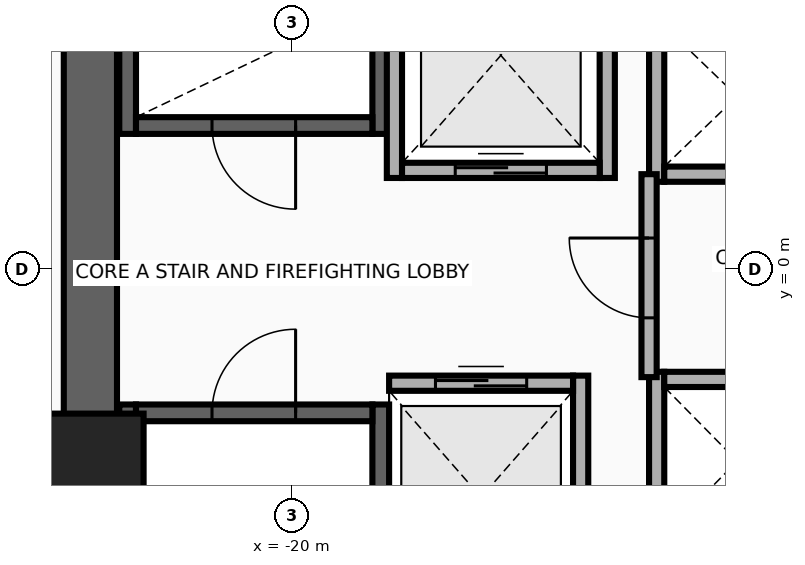
"""IFC4 building model, lengths in metres.
Left out: names, types, materials, properties, quantities, classifications, styles, units other than length and angle.
Written with IfcOpenShell. Run it as: python <this file> out.ifc"""

import sys

from ifc_helpers import new_model, si_unit, direction, frame, frame_2d, origin, origin_2d, place, context, subcontext, project, spatial, rectangle, extrude, source, transform, mapped, element, fill, save


model = new_model("IFC4")
c1 = context("Model", 3, precision=1e-05, world=origin(), true_north=direction((0.0, 1.0)))
c2 = subcontext(c1, "Body", "Model", "MODEL_VIEW")
j1 = project(units=[si_unit("LENGTHUNIT", "METRE"), si_unit("PLANEANGLEUNIT", "RADIAN")], contexts=[c1])
p1 = place(None, origin())
s1 = spatial("IfcSite", under=j1, at=p1, CompositionType="ELEMENT")
p2 = place(p1, origin())
s2 = spatial("IfcBuilding", under=s1, at=p2, CompositionType="ELEMENT")
p3 = place(p2, frame((0.0, 0.0, 66.7)))
s3 = spatial("IfcBuildingStorey", under=s2, at=p3, CompositionType="ELEMENT", Elevation=66.7)
for number, where, z_axis, x_axis in (
    (1, (-22.16, 1.78, 0.0), (0.0, 0.0, 1.0), (0.0, 1.0, 0.0)),
    (2, (-18.83, 1.78, 0.0), (0.0, 0.0, 1.0), (0.0, 1.0, 0.0)),
):
    element("IfcWall", number, at=place(p3, frame(where, z_axis=z_axis, x_axis=x_axis)), inside=s3, PredefinedType="SHEAR", context=c2, shape_type="SweptSolid", body=[
        extrude(rectangle(XDim=8.67, YDim=0.22, at=frame_2d((4.335, 0.0))), origin(), (0.0, 0.0, 1.0), 3.46),
    ])
p4 = place(p3, frame((-22.05, 1.89, 0.0), z_axis=(0.0, 0.0, 1.0), x_axis=(1.0, 0.0, 0.0)))
e3 = element("IfcWall", 3, at=p4, inside=s3, PredefinedType="SHEAR", context=c2, shape_type="SweptSolid", body=[
    extrude(rectangle(XDim=3.11, YDim=0.22, at=frame_2d((1.555, 0.0))), origin(), (0.0, 0.0, 1.0), 3.46),
])
p5 = place(p4, frame((1.0, 0.0, 0.0)))
e4 = element("IfcOpeningElement", 4, at=p5, cuts=e3, PredefinedType="OPENING", context=c2, shape_type="SweptSolid", body=[
    extrude(rectangle(XDim=1.1, YDim=2.15, at=frame_2d((0.55, 1.075))), frame((0.0, 0.125, 0.0), z_axis=(0.0, -1.0, 0.0), x_axis=(1.0, 0.0, 0.0)), (0.0, 0.0, 1.0), 0.25),
])
for number, where, z_axis, x_axis in (
    (5, (-22.16, -10.45, 0.0), (0.0, 0.0, 1.0), (0.0, 1.0, 0.0)),
    (6, (-18.83, -10.45, 0.0), (0.0, 0.0, 1.0), (0.0, 1.0, 0.0)),
):
    element("IfcWall", number, at=place(p3, frame(where, z_axis=z_axis, x_axis=x_axis)), inside=s3, PredefinedType="SHEAR", context=c2, shape_type="SweptSolid", body=[
        extrude(rectangle(XDim=8.67, YDim=0.22, at=frame_2d((4.335, 0.0))), origin(), (0.0, 0.0, 1.0), 3.46),
    ])
p6 = place(p3, frame((-22.05, -1.89, 0.0), z_axis=(0.0, 0.0, 1.0), x_axis=(1.0, 0.0, 0.0)))
e7 = element("IfcWall", 7, at=p6, inside=s3, PredefinedType="SHEAR", context=c2, shape_type="SweptSolid", body=[
    extrude(rectangle(XDim=3.11, YDim=0.22, at=frame_2d((1.555, 0.0))), origin(), (0.0, 0.0, 1.0), 3.46),
])
p7 = place(p6, frame((1.0, 0.0, 0.0)))
e8 = element("IfcOpeningElement", 8, at=p7, cuts=e7, PredefinedType="OPENING", context=c2, shape_type="SweptSolid", body=[
    extrude(rectangle(XDim=1.1, YDim=2.15, at=frame_2d((0.55, 1.075))), frame((0.0, 0.125, 0.0), z_axis=(0.0, -1.0, 0.0), x_axis=(1.0, 0.0, 0.0)), (0.0, 0.0, 1.0), 0.25),
])
p8 = place(p3, frame((-22.65, -11.15, 0.0), z_axis=(0.0, 0.0, 1.0), x_axis=(0.0, 1.0, 0.0)))
e9 = element("IfcWall", 9, at=p8, inside=s3, PredefinedType="SHEAR", context=c2, shape_type="SweptSolid", body=[
    extrude(rectangle(XDim=22.3, YDim=0.7, at=frame_2d((11.15, 0.0))), origin(), (0.0, 0.0, 1.0), 3.46),
])
m1 = source(origin(), c2, "Body", "SweptSolid", [
    extrude(rectangle(XDim=1.4, YDim=1.4, at=origin_2d()), origin(), (0.0, 0.0, 1.0), 3.7),
])
p9 = place(p3, frame((-22.65, -2.6, 0.0), z_axis=(0.0, 0.0, 1.0), x_axis=(1.0, 0.0, 0.0)))
e10 = element("IfcColumn", 10, at=p9, inside=s3, PredefinedType="COLUMN", context=c2, shape_type="MappedRepresentation", body=[
    mapped(m1, transform((0.0, 0.0, 0.0), x_axis=(1.0, 0.0, 0.0), y_axis=(0.0, 1.0, 0.0), z_axis=(0.0, 0.0, 1.0), scale=1.0)),
])
for number, where, z_axis, x_axis in (
    (11, (-18.65, 1.2, 0.0), (0.0, 0.0, 1.0), (0.0, 1.0, 0.0)),
    (12, (-15.85, 1.2, 0.0), (0.0, 0.0, 1.0), (0.0, 1.0, 0.0)),
):
    element("IfcWall", number, at=place(p3, frame(where, z_axis=z_axis, x_axis=x_axis)), inside=s3, PredefinedType="MOVABLE", context=c2, shape_type="SweptSolid", body=[
        extrude(rectangle(XDim=3.225, YDim=0.2, at=frame_2d((1.613, 0.0))), origin(), (0.0, 0.0, 1.0), 3.46),
    ])
p10 = place(p3, frame((-18.55, 1.3, 0.0), z_axis=(0.0, 0.0, 1.0), x_axis=(1.0, 0.0, 0.0)))
e13 = element("IfcWall", 13, at=p10, inside=s3, PredefinedType="MOVABLE", context=c2, shape_type="SweptSolid", body=[
    extrude(rectangle(XDim=2.6, YDim=0.2, at=frame_2d((1.3, 0.0))), origin(), (0.0, 0.0, 1.0), 3.46),
])
p11 = place(p10, frame((0.7, 0.0, 0.0)))
e14 = element("IfcOpeningElement", 14, at=p11, cuts=e13, PredefinedType="OPENING", context=c2, shape_type="SweptSolid", body=[
    extrude(rectangle(XDim=1.2, YDim=2.1, at=frame_2d((0.6, 1.05))), frame((0.0, 0.115, 0.0), z_axis=(0.0, -1.0, 0.0), x_axis=(1.0, 0.0, 0.0)), (0.0, 0.0, 1.0), 0.23),
])
p12 = place(p3, frame((-16.2, -4.6, 0.0), z_axis=(0.0, 0.0, 1.0), x_axis=(0.0, 1.0, 0.0)))
e15 = element("IfcWall", 15, at=p12, inside=s3, PredefinedType="MOVABLE", context=c2, shape_type="SweptSolid", body=[
    extrude(rectangle(XDim=3.2, YDim=0.2, at=frame_2d((1.6, 0.0))), origin(), (0.0, 0.0, 1.0), 3.46),
])
p13 = place(p3, frame((-18.72, -1.5, 0.0), z_axis=(0.0, 0.0, 1.0), x_axis=(1.0, 0.0, 0.0)))
e16 = element("IfcWall", 16, at=p13, inside=s3, PredefinedType="MOVABLE", context=c2, shape_type="SweptSolid", body=[
    extrude(rectangle(XDim=2.42, YDim=0.2, at=frame_2d((1.21, 0.0))), origin(), (0.0, 0.0, 1.0), 3.46),
])
p14 = place(p13, frame((0.61, 0.0, 0.0)))
e17 = element("IfcOpeningElement", 17, at=p14, cuts=e16, PredefinedType="OPENING", context=c2, shape_type="SweptSolid", body=[
    extrude(rectangle(XDim=1.2, YDim=2.1, at=frame_2d((0.6, 1.05))), frame((0.0, 0.115, 0.0), z_axis=(0.0, -1.0, 0.0), x_axis=(1.0, 0.0, 0.0)), (0.0, 0.0, 1.0), 0.23),
])
p15 = place(p3, frame((-15.2, 1.15, 0.0), z_axis=(0.0, 0.0, 1.0), x_axis=(0.0, 1.0, 0.0)))
e18 = element("IfcWall", 18, at=p15, inside=s3, PredefinedType="MOVABLE", context=c2, shape_type="SweptSolid", body=[
    extrude(rectangle(XDim=2.25, YDim=0.2, at=frame_2d((1.125, 0.0))), origin(), (0.0, 0.0, 1.0), 3.46),
])
p16 = place(p3, frame((-15.1, 1.25, 0.0), z_axis=(0.0, 0.0, 1.0), x_axis=(1.0, 0.0, 0.0)))
e19 = element("IfcWall", 19, at=p16, inside=s3, PredefinedType="MOVABLE", context=c2, shape_type="SweptSolid", body=[
    extrude(rectangle(XDim=1.92, YDim=0.2, at=frame_2d((0.96, 0.0))), origin(), (0.0, 0.0, 1.0), 3.46),
])
p17 = place(p3, frame((-15.2, -3.7, 0.0), z_axis=(0.0, 0.0, 1.0), x_axis=(0.0, 1.0, 0.0)))
e20 = element("IfcWall", 20, at=p17, inside=s3, PredefinedType="MOVABLE", context=c2, shape_type="SweptSolid", body=[
    extrude(rectangle(XDim=2.35, YDim=0.2, at=frame_2d((1.175, 0.0))), origin(), (0.0, 0.0, 1.0), 3.46),
])
p18 = place(p3, frame((-15.1, -1.45, 0.0), z_axis=(0.0, 0.0, 1.0), x_axis=(1.0, 0.0, 0.0)))
e21 = element("IfcWall", 21, at=p18, inside=s3, PredefinedType="MOVABLE", context=c2, shape_type="SweptSolid", body=[
    extrude(rectangle(XDim=1.92, YDim=0.2, at=frame_2d((0.96, 0.0))), origin(), (0.0, 0.0, 1.0), 3.46),
])
p19 = place(p3, frame((-15.3, -1.42, 0.0), z_axis=(0.0, 0.0, 1.0), x_axis=(0.0, 1.0, 0.0)))
e22 = element("IfcWall", 22, at=p19, inside=s3, PredefinedType="PARTITIONING", context=c2, shape_type="SweptSolid", body=[
    extrude(rectangle(XDim=2.67, YDim=0.2, at=frame_2d((1.335, 0.0))), origin(), (0.0, 0.0, 1.0), 3.46),
])
p20 = place(p19, frame((0.78, 0.0, 0.0)))
e23 = element("IfcOpeningElement", 23, at=p20, cuts=e22, PredefinedType="OPENING", context=c2, shape_type="SweptSolid", body=[
    extrude(rectangle(XDim=1.05, YDim=2.15, at=frame_2d((0.525, 1.075))), frame((0.0, 0.115, 0.0), z_axis=(0.0, -1.0, 0.0), x_axis=(1.0, 0.0, 0.0)), (0.0, 0.0, 1.0), 0.23),
])
p21 = place(p11, origin())
e24 = element("IfcDoor", 24, at=p21, inside=s3, OperationType="DOUBLE_DOOR_SLIDING", PredefinedType="DOOR", context=c2, shape_type="SweptSolid", body=[
    extrude(rectangle(XDim=1.2, YDim=2.1, at=frame_2d((0.6, 1.05))), frame((0.0, 0.025, 0.0), z_axis=(0.0, -1.0, 0.0), x_axis=(1.0, 0.0, 0.0)), (0.0, 0.0, 1.0), 0.05),
])
fill(e14, e24)
p22 = place(p14, origin())
e25 = element("IfcDoor", 25, at=p22, inside=s3, OperationType="DOUBLE_DOOR_SLIDING", PredefinedType="DOOR", context=c2, shape_type="SweptSolid", body=[
    extrude(rectangle(XDim=1.2, YDim=2.1, at=frame_2d((0.6, 1.05))), frame((0.0, 0.025, 0.0), z_axis=(0.0, -1.0, 0.0), x_axis=(1.0, 0.0, 0.0)), (0.0, 0.0, 1.0), 0.05),
])
fill(e17, e25)
p23 = place(p20, origin())
e26 = element("IfcDoor", 26, at=p23, inside=s3, OperationType="SINGLE_SWING_RIGHT", PredefinedType="DOOR", context=c2, shape_type="SweptSolid", body=[
    extrude(rectangle(XDim=1.05, YDim=2.15, at=frame_2d((0.525, 1.075))), frame((0.0, 0.025, 0.0), z_axis=(0.0, -1.0, 0.0), x_axis=(1.0, 0.0, 0.0)), (0.0, 0.0, 1.0), 0.05),
])
fill(e23, e26)
p24 = place(p5, frame((1.1, 0.0, 0.0), z_axis=(0.0, 0.0, 1.0), x_axis=(-1.0, 0.0, 0.0)))
e27 = element("IfcDoor", 27, at=p24, inside=s3, OperationType="SINGLE_SWING_LEFT", PredefinedType="DOOR", context=c2, shape_type="SweptSolid", body=[
    extrude(rectangle(XDim=1.1, YDim=2.15, at=frame_2d((0.55, 1.075))), frame((0.0, 0.025, 0.0), z_axis=(0.0, -1.0, 0.0), x_axis=(1.0, 0.0, 0.0)), (0.0, 0.0, 1.0), 0.05),
])
fill(e4, e27)
p25 = place(p7, origin())
e28 = element("IfcDoor", 28, at=p25, inside=s3, OperationType="SINGLE_SWING_RIGHT", PredefinedType="DOOR", context=c2, shape_type="SweptSolid", body=[
    extrude(rectangle(XDim=1.1, YDim=2.15, at=frame_2d((0.55, 1.075))), frame((0.0, 0.025, 0.0), z_axis=(0.0, -1.0, 0.0), x_axis=(1.0, 0.0, 0.0)), (0.0, 0.0, 1.0), 0.05),
])
fill(e8, e28)
save(model, sys.argv[1])
